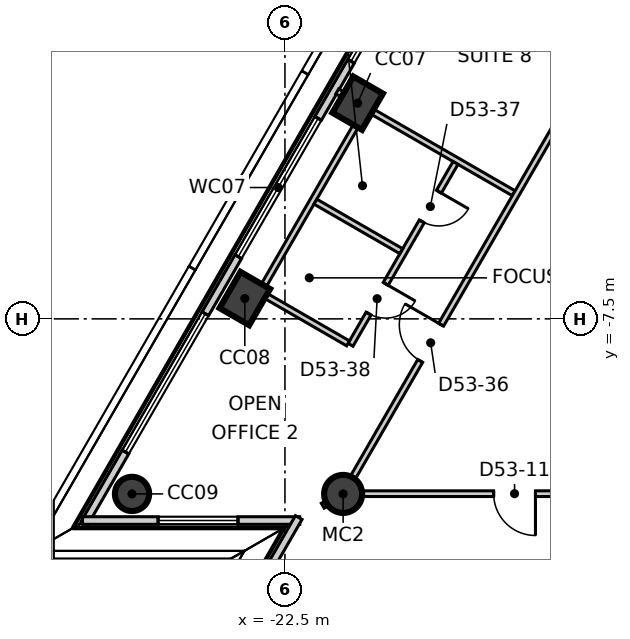
"""IFC4 building model, lengths in metres.
Left out: names, types, materials, properties, quantities, classifications, styles, units other than length and angle.
Written with IfcOpenShell. Run it as: python <this file> out.ifc"""

import sys

from ifc_helpers import new_model, si_unit, direction, frame, frame_2d, origin, origin_2d, place, context, subcontext, project, spatial, rectangle, circle, extrude, element, fill, save


model = new_model("IFC4")
c1 = context("Model", 3, precision=1e-05, world=origin(), true_north=direction((0.0, 1.0)))
c2 = subcontext(c1, "Body", "Model", "MODEL_VIEW")
j1 = project(units=[si_unit("LENGTHUNIT", "METRE"), si_unit("PLANEANGLEUNIT", "RADIAN")], contexts=[c1])
p1 = place(None, origin())
s1 = spatial("IfcSite", under=j1, at=p1, CompositionType="ELEMENT")
p2 = place(p1, origin())
s2 = spatial("IfcBuilding", under=s1, at=p2, CompositionType="ELEMENT")
p3 = place(p2, frame((0.0, 0.0, 227.3)))
s3 = spatial("IfcBuildingStorey", under=s2, at=p3, CompositionType="ELEMENT", Elevation=227.3)
for number, where, z_axis, x_axis in (
    (1, (-20.587, -1.824, -0.3), (0.0, 0.0, 1.0), (0.5, 0.866, 0.0)),
    (2, (-23.556, -6.965, -0.3), (0.0, 0.0, 1.0), (0.5, 0.866, 0.0)),
):
    element("IfcColumn", number, at=place(p3, frame(where, z_axis=z_axis, x_axis=x_axis)), inside=s3, PredefinedType="COLUMN", context=c2, shape_type="SweptSolid", body=[
        extrude(rectangle(XDim=1.1, YDim=0.9, at=origin_2d()), origin(), (0.0, 0.0, 1.0), 4.0),
    ])
p4 = place(p3, frame((-26.524, -12.106, -0.3), z_axis=(0.0, 0.0, 1.0), x_axis=(0.5, 0.866025403784, 0.0)))
e3 = element("IfcColumn", 3, at=p4, inside=s3, PredefinedType="COLUMN", context=c2, shape_type="SweptSolid", body=[
    extrude(circle(Radius=0.45, at=origin_2d()), origin(), (0.0, 0.0, 1.0), 4.0),
])
p5 = place(p3, frame((-20.969, -12.106, -0.3), z_axis=(0.0, 0.0, 1.0), x_axis=(1.0, 0.0, 0.0)))
e4 = element("IfcColumn", 4, at=p5, inside=s3, PredefinedType="COLUMN", context=c2, shape_type="SweptSolid", body=[
    extrude(circle(Radius=0.5, at=origin_2d()), origin(), (0.0, 0.0, 1.0), 4.0),
])
p6 = place(p3, frame((-2.732, 30.501, 0.0), z_axis=(0.0, 0.0, 1.0), x_axis=(-0.500023345841, -0.866011924637, 0.0)))
e5 = element("IfcWall", 5, at=p6, inside=s3, PredefinedType="ELEMENTEDWALL", context=c2, shape_type="SweptSolid", body=[
    extrude(rectangle(XDim=50.078, YDim=0.2, at=frame_2d((25.039, 0.0))), origin(), (0.0, 0.0, 1.0), 3.7),
])
p7 = place(p6, frame((2.171, 0.0, 0.9)))
e6 = element("IfcOpeningElement", 6, at=p7, cuts=e5, PredefinedType="OPENING", context=c2, shape_type="SweptSolid", body=[
    extrude(rectangle(XDim=4.2, YDim=2.5, at=frame_2d((2.1, 1.25))), frame((0.0, 0.11, 0.0), z_axis=(0.0, -1.0, 0.0), x_axis=(1.0, 0.0, 0.0)), (0.0, 0.0, 1.0), 0.22),
])
p8 = place(p6, frame((8.107, 0.0, 0.9)))
e7 = element("IfcOpeningElement", 7, at=p8, cuts=e5, PredefinedType="OPENING", context=c2, shape_type="SweptSolid", body=[
    extrude(rectangle(XDim=4.2, YDim=2.5, at=frame_2d((2.1, 1.25))), frame((0.0, 0.11, 0.0), z_axis=(0.0, -1.0, 0.0), x_axis=(1.0, 0.0, 0.0)), (0.0, 0.0, 1.0), 0.22),
])
p9 = place(p6, frame((14.044, 0.0, 0.9)))
e8 = element("IfcOpeningElement", 8, at=p9, cuts=e5, PredefinedType="OPENING", context=c2, shape_type="SweptSolid", body=[
    extrude(rectangle(XDim=4.2, YDim=2.5, at=frame_2d((2.1, 1.25))), frame((0.0, 0.11, 0.0), z_axis=(0.0, -1.0, 0.0), x_axis=(1.0, 0.0, 0.0)), (0.0, 0.0, 1.0), 0.22),
])
p10 = place(p6, frame((19.98, 0.0, 0.9)))
e9 = element("IfcOpeningElement", 9, at=p10, cuts=e5, PredefinedType="OPENING", context=c2, shape_type="SweptSolid", body=[
    extrude(rectangle(XDim=4.2, YDim=2.5, at=frame_2d((2.1, 1.25))), frame((0.0, 0.11, 0.0), z_axis=(0.0, -1.0, 0.0), x_axis=(1.0, 0.0, 0.0)), (0.0, 0.0, 1.0), 0.22),
])
p11 = place(p6, frame((25.917, 0.0, 0.9)))
e10 = element("IfcOpeningElement", 10, at=p11, cuts=e5, PredefinedType="OPENING", context=c2, shape_type="SweptSolid", body=[
    extrude(rectangle(XDim=4.2, YDim=2.5, at=frame_2d((2.1, 1.25))), frame((0.0, 0.11, 0.0), z_axis=(0.0, -1.0, 0.0), x_axis=(1.0, 0.0, 0.0)), (0.0, 0.0, 1.0), 0.22),
])
p12 = place(p6, frame((31.853, 0.0, 0.9)))
e11 = element("IfcOpeningElement", 11, at=p12, cuts=e5, PredefinedType="OPENING", context=c2, shape_type="SweptSolid", body=[
    extrude(rectangle(XDim=4.2, YDim=2.5, at=frame_2d((2.1, 1.25))), frame((0.0, 0.11, 0.0), z_axis=(0.0, -1.0, 0.0), x_axis=(1.0, 0.0, 0.0)), (0.0, 0.0, 1.0), 0.22),
])
p13 = place(p6, frame((37.79, 0.0, 0.9)))
e12 = element("IfcOpeningElement", 12, at=p13, cuts=e5, PredefinedType="OPENING", context=c2, shape_type="SweptSolid", body=[
    extrude(rectangle(XDim=4.2, YDim=2.5, at=frame_2d((2.1, 1.25))), frame((0.0, 0.11, 0.0), z_axis=(0.0, -1.0, 0.0), x_axis=(1.0, 0.0, 0.0)), (0.0, 0.0, 1.0), 0.22),
])
p14 = place(p6, frame((43.726, 0.0, 0.9)))
e13 = element("IfcOpeningElement", 13, at=p14, cuts=e5, PredefinedType="OPENING", context=c2, shape_type="SweptSolid", body=[
    extrude(rectangle(XDim=4.2, YDim=2.5, at=frame_2d((2.1, 1.25))), frame((0.0, 0.11, 0.0), z_axis=(0.0, -1.0, 0.0), x_axis=(1.0, 0.0, 0.0)), (0.0, 0.0, 1.0), 0.22),
])
p15 = place(p3, frame((-27.827, -12.806, 0.0), z_axis=(0.0, 0.0, 1.0), x_axis=(1.0, 0.0, 0.0)))
e14 = element("IfcWall", 14, at=p15, inside=s3, PredefinedType="ELEMENTEDWALL", context=c2, shape_type="SweptSolid", body=[
    extrude(rectangle(XDim=5.715, YDim=0.2, at=frame_2d((2.857, 0.0))), origin(), (0.0, 0.0, 1.0), 3.7),
])
p16 = place(p15, frame((1.99, 0.0, 0.9)))
e15 = element("IfcOpeningElement", 15, at=p16, cuts=e14, PredefinedType="OPENING", context=c2, shape_type="SweptSolid", body=[
    extrude(rectangle(XDim=2.1, YDim=2.5, at=frame_2d((1.05, 1.25))), frame((0.0, 0.11, 0.0), z_axis=(0.0, -1.0, 0.0), x_axis=(1.0, 0.0, 0.0)), (0.0, 0.0, 1.0), 0.22),
])
p17 = place(p3, frame((-22.137, -12.728, 0.0), z_axis=(0.0, 0.0, 1.0), x_axis=(-0.49987899677, -0.866095253761, 0.0)))
e16 = element("IfcWall", 16, at=p17, inside=s3, PredefinedType="ELEMENTEDWALL", context=c2, shape_type="SweptSolid", body=[
    extrude(rectangle(XDim=5.715, YDim=0.2, at=frame_2d((2.858, 0.0))), origin(), (0.0, 0.0, 1.0), 3.7),
])
p18 = place(p17, frame((1.39, 0.0, 0.9)))
e17 = element("IfcOpeningElement", 17, at=p18, cuts=e16, PredefinedType="OPENING", context=c2, shape_type="SweptSolid", body=[
    extrude(rectangle(XDim=2.1, YDim=2.5, at=frame_2d((1.05, 1.25))), frame((0.0, 0.11, 0.0), z_axis=(0.0, -1.0, 0.0), x_axis=(1.0, 0.0, 0.0)), (0.0, 0.0, 1.0), 0.22),
])
p19 = place(p3, frame((-21.506, -12.416, 0.0), z_axis=(0.0, 0.0, 1.0), x_axis=(0.866102227088, 0.499866914522, 0.0)))
e18 = element("IfcWall", 18, at=p19, inside=s3, PredefinedType="PARTITIONING", context=c2, shape_type="SweptSolid", body=[
    extrude(rectangle(XDim=0.634, YDim=0.15, at=frame_2d((0.317, 0.0))), origin(), (0.0, 0.0, 1.0), 3.7),
])
p20 = place(p3, frame((-21.124, -1.514, 0.0), z_axis=(0.0, 0.0, 1.0), x_axis=(0.866032438121, -0.499987815973, 0.0)))
e19 = element("IfcWall", 19, at=p20, inside=s3, PredefinedType="PARTITIONING", context=c2, shape_type="SweptSolid", body=[
    extrude(rectangle(XDim=5.363, YDim=0.15, at=frame_2d((2.681, 0.0))), origin(), (0.0, 0.0, 1.0), 3.7),
])
p21 = place(p3, frame((-20.882, -11.969, 0.0), z_axis=(0.0, 0.0, 1.0), x_axis=(0.499998738735, 0.866026131975, 0.0)))
e20 = element("IfcWall", 20, at=p21, inside=s3, PredefinedType="PARTITIONING", context=c2, shape_type="SweptSolid", body=[
    extrude(rectangle(XDim=41.764, YDim=0.15, at=frame_2d((20.882, 0.0))), origin(), (0.0, 0.0, 1.0), 3.7),
])
p22 = place(p21, frame((33.714, 0.0, 0.0)))
e21 = element("IfcOpeningElement", 21, at=p22, cuts=e20, PredefinedType="OPENING", context=c2, shape_type="SweptSolid", body=[
    extrude(rectangle(XDim=1.1, YDim=2.1, at=frame_2d((0.55, 1.05))), frame((0.0, 0.085, 0.0), z_axis=(0.0, -1.0, 0.0), x_axis=(1.0, 0.0, 0.0)), (0.0, 0.0, 1.0), 0.17),
])
p23 = place(p21, frame((23.293, 0.0, 0.0)))
e22 = element("IfcOpeningElement", 22, at=p23, cuts=e20, PredefinedType="OPENING", context=c2, shape_type="SweptSolid", body=[
    extrude(rectangle(XDim=1.0, YDim=2.1, at=frame_2d((0.5, 1.05))), frame((0.0, 0.085, 0.0), z_axis=(0.0, -1.0, 0.0), x_axis=(1.0, 0.0, 0.0)), (0.0, 0.0, 1.0), 0.17),
])
p24 = place(p21, frame((13.356, 0.0, 0.0)))
e23 = element("IfcOpeningElement", 23, at=p24, cuts=e20, PredefinedType="OPENING", context=c2, shape_type="SweptSolid", body=[
    extrude(rectangle(XDim=1.1, YDim=2.1, at=frame_2d((0.55, 1.05))), frame((0.0, 0.085, 0.0), z_axis=(0.0, -1.0, 0.0), x_axis=(1.0, 0.0, 0.0)), (0.0, 0.0, 1.0), 0.17),
])
p25 = place(p21, frame((18.556, 0.0, 0.0)))
e24 = element("IfcOpeningElement", 24, at=p25, cuts=e20, PredefinedType="OPENING", context=c2, shape_type="SweptSolid", body=[
    extrude(rectangle(XDim=0.9, YDim=2.1, at=frame_2d((0.45, 1.05))), frame((0.0, 0.085, 0.0), z_axis=(0.0, -1.0, 0.0), x_axis=(1.0, 0.0, 0.0)), (0.0, 0.0, 1.0), 0.17),
])
p26 = place(p21, frame((15.556, 0.0, 0.0)))
e25 = element("IfcOpeningElement", 25, at=p26, cuts=e20, PredefinedType="OPENING", context=c2, shape_type="SweptSolid", body=[
    extrude(rectangle(XDim=0.9, YDim=2.1, at=frame_2d((0.45, 1.05))), frame((0.0, 0.085, 0.0), z_axis=(0.0, -1.0, 0.0), x_axis=(1.0, 0.0, 0.0)), (0.0, 0.0, 1.0), 0.17),
])
p27 = place(p21, frame((3.883, 0.0, 0.0)))
e26 = element("IfcOpeningElement", 26, at=p27, cuts=e20, PredefinedType="OPENING", context=c2, shape_type="SweptSolid", body=[
    extrude(rectangle(XDim=1.1, YDim=2.1, at=frame_2d((0.55, 1.05))), frame((0.0, 0.085, 0.0), z_axis=(0.0, -1.0, 0.0), x_axis=(1.0, 0.0, 0.0)), (0.0, 0.0, 1.0), 0.17),
])
p28 = place(p3, frame((-20.808, -12.1, 0.0), z_axis=(0.0, 0.0, 1.0), x_axis=(1.0, 0.0, 0.0)))
e27 = element("IfcWall", 27, at=p28, inside=s3, PredefinedType="PARTITIONING", context=c2, shape_type="SweptSolid", body=[
    extrude(rectangle(XDim=41.766, YDim=0.15, at=frame_2d((20.883, 0.0))), origin(), (0.0, 0.0, 1.0), 3.7),
])
p29 = place(p28, frame((3.8, 0.0, 0.0)))
e28 = element("IfcOpeningElement", 28, at=p29, cuts=e27, PredefinedType="OPENING", context=c2, shape_type="SweptSolid", body=[
    extrude(rectangle(XDim=1.1, YDim=2.1, at=frame_2d((0.55, 1.05))), frame((0.0, 0.085, 0.0), z_axis=(0.0, -1.0, 0.0), x_axis=(1.0, 0.0, 0.0)), (0.0, 0.0, 1.0), 0.17),
])
p30 = place(p28, frame((18.685, 0.0, 0.0)))
e29 = element("IfcOpeningElement", 29, at=p30, cuts=e27, PredefinedType="OPENING", context=c2, shape_type="SweptSolid", body=[
    extrude(rectangle(XDim=1.1, YDim=2.1, at=frame_2d((0.55, 1.05))), frame((0.0, 0.085, 0.0), z_axis=(0.0, -1.0, 0.0), x_axis=(1.0, 0.0, 0.0)), (0.0, 0.0, 1.0), 0.17),
])
p31 = place(p28, frame((10.085, 0.0, 0.0)))
e30 = element("IfcOpeningElement", 30, at=p31, cuts=e27, PredefinedType="OPENING", context=c2, shape_type="SweptSolid", body=[
    extrude(rectangle(XDim=0.9, YDim=2.1, at=frame_2d((0.45, 1.05))), frame((0.0, 0.085, 0.0), z_axis=(0.0, -1.0, 0.0), x_axis=(1.0, 0.0, 0.0)), (0.0, 0.0, 1.0), 0.17),
])
p32 = place(p28, frame((13.285, 0.0, 0.0)))
e31 = element("IfcOpeningElement", 31, at=p32, cuts=e27, PredefinedType="OPENING", context=c2, shape_type="SweptSolid", body=[
    extrude(rectangle(XDim=0.9, YDim=2.1, at=frame_2d((0.45, 1.05))), frame((0.0, 0.085, 0.0), z_axis=(0.0, -1.0, 0.0), x_axis=(1.0, 0.0, 0.0)), (0.0, 0.0, 1.0), 0.17),
])
p33 = place(p28, frame((15.985, 0.0, 0.0)))
e32 = element("IfcOpeningElement", 32, at=p33, cuts=e27, PredefinedType="OPENING", context=c2, shape_type="SweptSolid", body=[
    extrude(rectangle(XDim=1.0, YDim=2.1, at=frame_2d((0.5, 1.05))), frame((0.0, 0.085, 0.0), z_axis=(0.0, -1.0, 0.0), x_axis=(1.0, 0.0, 0.0)), (0.0, 0.0, 1.0), 0.17),
])
p34 = place(p28, frame((29.158, 0.0, 0.0)))
e33 = element("IfcOpeningElement", 33, at=p34, cuts=e27, PredefinedType="OPENING", context=c2, shape_type="SweptSolid", body=[
    extrude(rectangle(XDim=1.1, YDim=2.1, at=frame_2d((0.55, 1.05))), frame((0.0, 0.085, 0.0), z_axis=(0.0, -1.0, 0.0), x_axis=(1.0, 0.0, 0.0)), (0.0, 0.0, 1.0), 0.17),
])
p35 = place(p28, frame((22.158, 0.0, 0.0)))
e34 = element("IfcOpeningElement", 34, at=p35, cuts=e27, PredefinedType="OPENING", context=c2, shape_type="SweptSolid", body=[
    extrude(rectangle(XDim=0.9, YDim=2.1, at=frame_2d((0.45, 1.05))), frame((0.0, 0.085, 0.0), z_axis=(0.0, -1.0, 0.0), x_axis=(1.0, 0.0, 0.0)), (0.0, 0.0, 1.0), 0.17),
])
p36 = place(p28, frame((25.158, 0.0, 0.0)))
e35 = element("IfcOpeningElement", 35, at=p36, cuts=e27, PredefinedType="OPENING", context=c2, shape_type="SweptSolid", body=[
    extrude(rectangle(XDim=0.9, YDim=2.1, at=frame_2d((0.45, 1.05))), frame((0.0, 0.085, 0.0), z_axis=(0.0, -1.0, 0.0), x_axis=(1.0, 0.0, 0.0)), (0.0, 0.0, 1.0), 0.17),
])
p37 = place(p28, frame((36.731, 0.0, 0.0)))
e36 = element("IfcOpeningElement", 36, at=p37, cuts=e27, PredefinedType="OPENING", context=c2, shape_type="SweptSolid", body=[
    extrude(rectangle(XDim=1.0, YDim=2.1, at=frame_2d((0.5, 1.05))), frame((0.0, 0.085, 0.0), z_axis=(0.0, -1.0, 0.0), x_axis=(1.0, 0.0, 0.0)), (0.0, 0.0, 1.0), 0.17),
])
p38 = place(p3, frame((-20.774, -8.182, 0.0), z_axis=(0.0, 0.0, 1.0), x_axis=(0.499917542299, 0.866073005526, 0.0)))
e37 = element("IfcWall", 37, at=p38, inside=s3, PredefinedType="PARTITIONING", context=c2, shape_type="SweptSolid", body=[
    extrude(rectangle(XDim=5.525, YDim=0.15, at=frame_2d((2.762, 0.0))), origin(), (0.0, 0.0, 1.0), 3.7),
])
p39 = place(p38, frame((3.75, 0.0, 0.0)))
e38 = element("IfcOpeningElement", 38, at=p39, cuts=e37, PredefinedType="OPENING", context=c2, shape_type="SweptSolid", body=[
    extrude(rectangle(XDim=0.9, YDim=2.1, at=frame_2d((0.45, 1.05))), frame((0.0, 0.085, 0.0), z_axis=(0.0, -1.0, 0.0), x_axis=(1.0, 0.0, 0.0)), (0.0, 0.0, 1.0), 0.17),
])
p40 = place(p38, frame((0.95, 0.0, 0.0)))
e39 = element("IfcOpeningElement", 39, at=p40, cuts=e37, PredefinedType="OPENING", context=c2, shape_type="SweptSolid", body=[
    extrude(rectangle(XDim=0.9, YDim=2.1, at=frame_2d((0.45, 1.05))), frame((0.0, 0.085, 0.0), z_axis=(0.0, -1.0, 0.0), x_axis=(1.0, 0.0, 0.0)), (0.0, 0.0, 1.0), 0.17),
])
p41 = place(p3, frame((-23.163, -6.803, 0.0), z_axis=(0.0, 0.0, 1.0), x_axis=(0.499950687084, 0.866053872738, 0.0)))
e40 = element("IfcWall", 40, at=p41, inside=s3, PredefinedType="PARTITIONING", context=c2, shape_type="SweptSolid", body=[
    extrude(rectangle(XDim=5.525, YDim=0.15, at=frame_2d((2.762, 0.0))), origin(), (0.0, 0.0, 1.0), 2.95),
])
p42 = place(p3, frame((-23.098, -6.84, 0.0), z_axis=(0.0, 0.0, 1.0), x_axis=(0.865889396464, -0.500235497633, 0.0)))
e41 = element("IfcWall", 41, at=p42, inside=s3, PredefinedType="PARTITIONING", context=c2, shape_type="SweptSolid", body=[
    extrude(rectangle(XDim=2.609, YDim=0.15, at=frame_2d((1.304, 0.0))), origin(), (0.0, 0.0, 1.0), 3.7),
])
p43 = place(p3, frame((-21.698, -4.416, 0.0), z_axis=(0.0, 0.0, 1.0), x_axis=(0.8660749285, -0.499914210863, 0.0)))
e42 = element("IfcWall", 42, at=p43, inside=s3, PredefinedType="PARTITIONING", context=c2, shape_type="SweptSolid", body=[
    extrude(rectangle(XDim=2.608, YDim=0.15, at=frame_2d((1.304, 0.0))), origin(), (0.0, 0.0, 1.0), 3.7),
])
p44 = place(p12, origin())
e43 = element("IfcWindow", 43, at=p44, inside=s3, PartitioningType="SINGLE_PANEL", PredefinedType="WINDOW", context=c2, shape_type="SweptSolid", body=[
    extrude(rectangle(XDim=4.2, YDim=2.5, at=frame_2d((2.1, 1.25))), frame((0.0, 0.03, 0.0), z_axis=(0.0, -1.0, 0.0), x_axis=(1.0, 0.0, 0.0)), (0.0, 0.0, 1.0), 0.06),
])
fill(e11, e43)
p45 = place(p13, origin())
e44 = element("IfcWindow", 44, at=p45, inside=s3, PartitioningType="SINGLE_PANEL", PredefinedType="WINDOW", context=c2, shape_type="SweptSolid", body=[
    extrude(rectangle(XDim=4.2, YDim=2.5, at=frame_2d((2.1, 1.25))), frame((0.0, 0.03, 0.0), z_axis=(0.0, -1.0, 0.0), x_axis=(1.0, 0.0, 0.0)), (0.0, 0.0, 1.0), 0.06),
])
fill(e12, e44)
p46 = place(p14, origin())
e45 = element("IfcWindow", 45, at=p46, inside=s3, PartitioningType="SINGLE_PANEL", PredefinedType="WINDOW", context=c2, shape_type="SweptSolid", body=[
    extrude(rectangle(XDim=4.2, YDim=2.5, at=frame_2d((2.1, 1.25))), frame((0.0, 0.03, 0.0), z_axis=(0.0, -1.0, 0.0), x_axis=(1.0, 0.0, 0.0)), (0.0, 0.0, 1.0), 0.06),
])
fill(e13, e45)
p47 = place(p16, origin())
e46 = element("IfcWindow", 46, at=p47, inside=s3, PartitioningType="SINGLE_PANEL", PredefinedType="WINDOW", context=c2, shape_type="SweptSolid", body=[
    extrude(rectangle(XDim=2.1, YDim=2.5, at=frame_2d((1.05, 1.25))), frame((0.0, 0.03, 0.0), z_axis=(0.0, -1.0, 0.0), x_axis=(1.0, 0.0, 0.0)), (0.0, 0.0, 1.0), 0.06),
])
fill(e15, e46)
p48 = place(p29, origin())
e47 = element("IfcDoor", 47, at=p48, inside=s3, OperationType="SINGLE_SWING_RIGHT", PredefinedType="DOOR", context=c2, shape_type="SweptSolid", body=[
    extrude(rectangle(XDim=1.1, YDim=2.1, at=frame_2d((0.55, 1.05))), frame((0.0, 0.025, 0.0), z_axis=(0.0, -1.0, 0.0), x_axis=(1.0, 0.0, 0.0)), (0.0, 0.0, 1.0), 0.05),
])
fill(e28, e47)
p49 = place(p27, origin())
e48 = element("IfcDoor", 48, at=p49, inside=s3, OperationType="SINGLE_SWING_LEFT", PredefinedType="DOOR", context=c2, shape_type="SweptSolid", body=[
    extrude(rectangle(XDim=1.1, YDim=2.1, at=frame_2d((0.55, 1.05))), frame((0.0, 0.025, 0.0), z_axis=(0.0, -1.0, 0.0), x_axis=(1.0, 0.0, 0.0)), (0.0, 0.0, 1.0), 0.05),
])
fill(e26, e48)
p50 = place(p39, origin())
e49 = element("IfcDoor", 49, at=p50, inside=s3, OperationType="SINGLE_SWING_RIGHT", PredefinedType="DOOR", context=c2, shape_type="SweptSolid", body=[
    extrude(rectangle(XDim=0.9, YDim=2.1, at=frame_2d((0.45, 1.05))), frame((0.0, 0.025, 0.0), z_axis=(0.0, -1.0, 0.0), x_axis=(1.0, 0.0, 0.0)), (0.0, 0.0, 1.0), 0.05),
])
fill(e38, e49)
p51 = place(p40, origin())
e50 = element("IfcDoor", 50, at=p51, inside=s3, OperationType="SINGLE_SWING_RIGHT", PredefinedType="DOOR", context=c2, shape_type="SweptSolid", body=[
    extrude(rectangle(XDim=0.9, YDim=2.1, at=frame_2d((0.45, 1.05))), frame((0.0, 0.025, 0.0), z_axis=(0.0, -1.0, 0.0), x_axis=(1.0, 0.0, 0.0)), (0.0, 0.0, 1.0), 0.05),
])
fill(e39, e50)
save(model, sys.argv[1])
